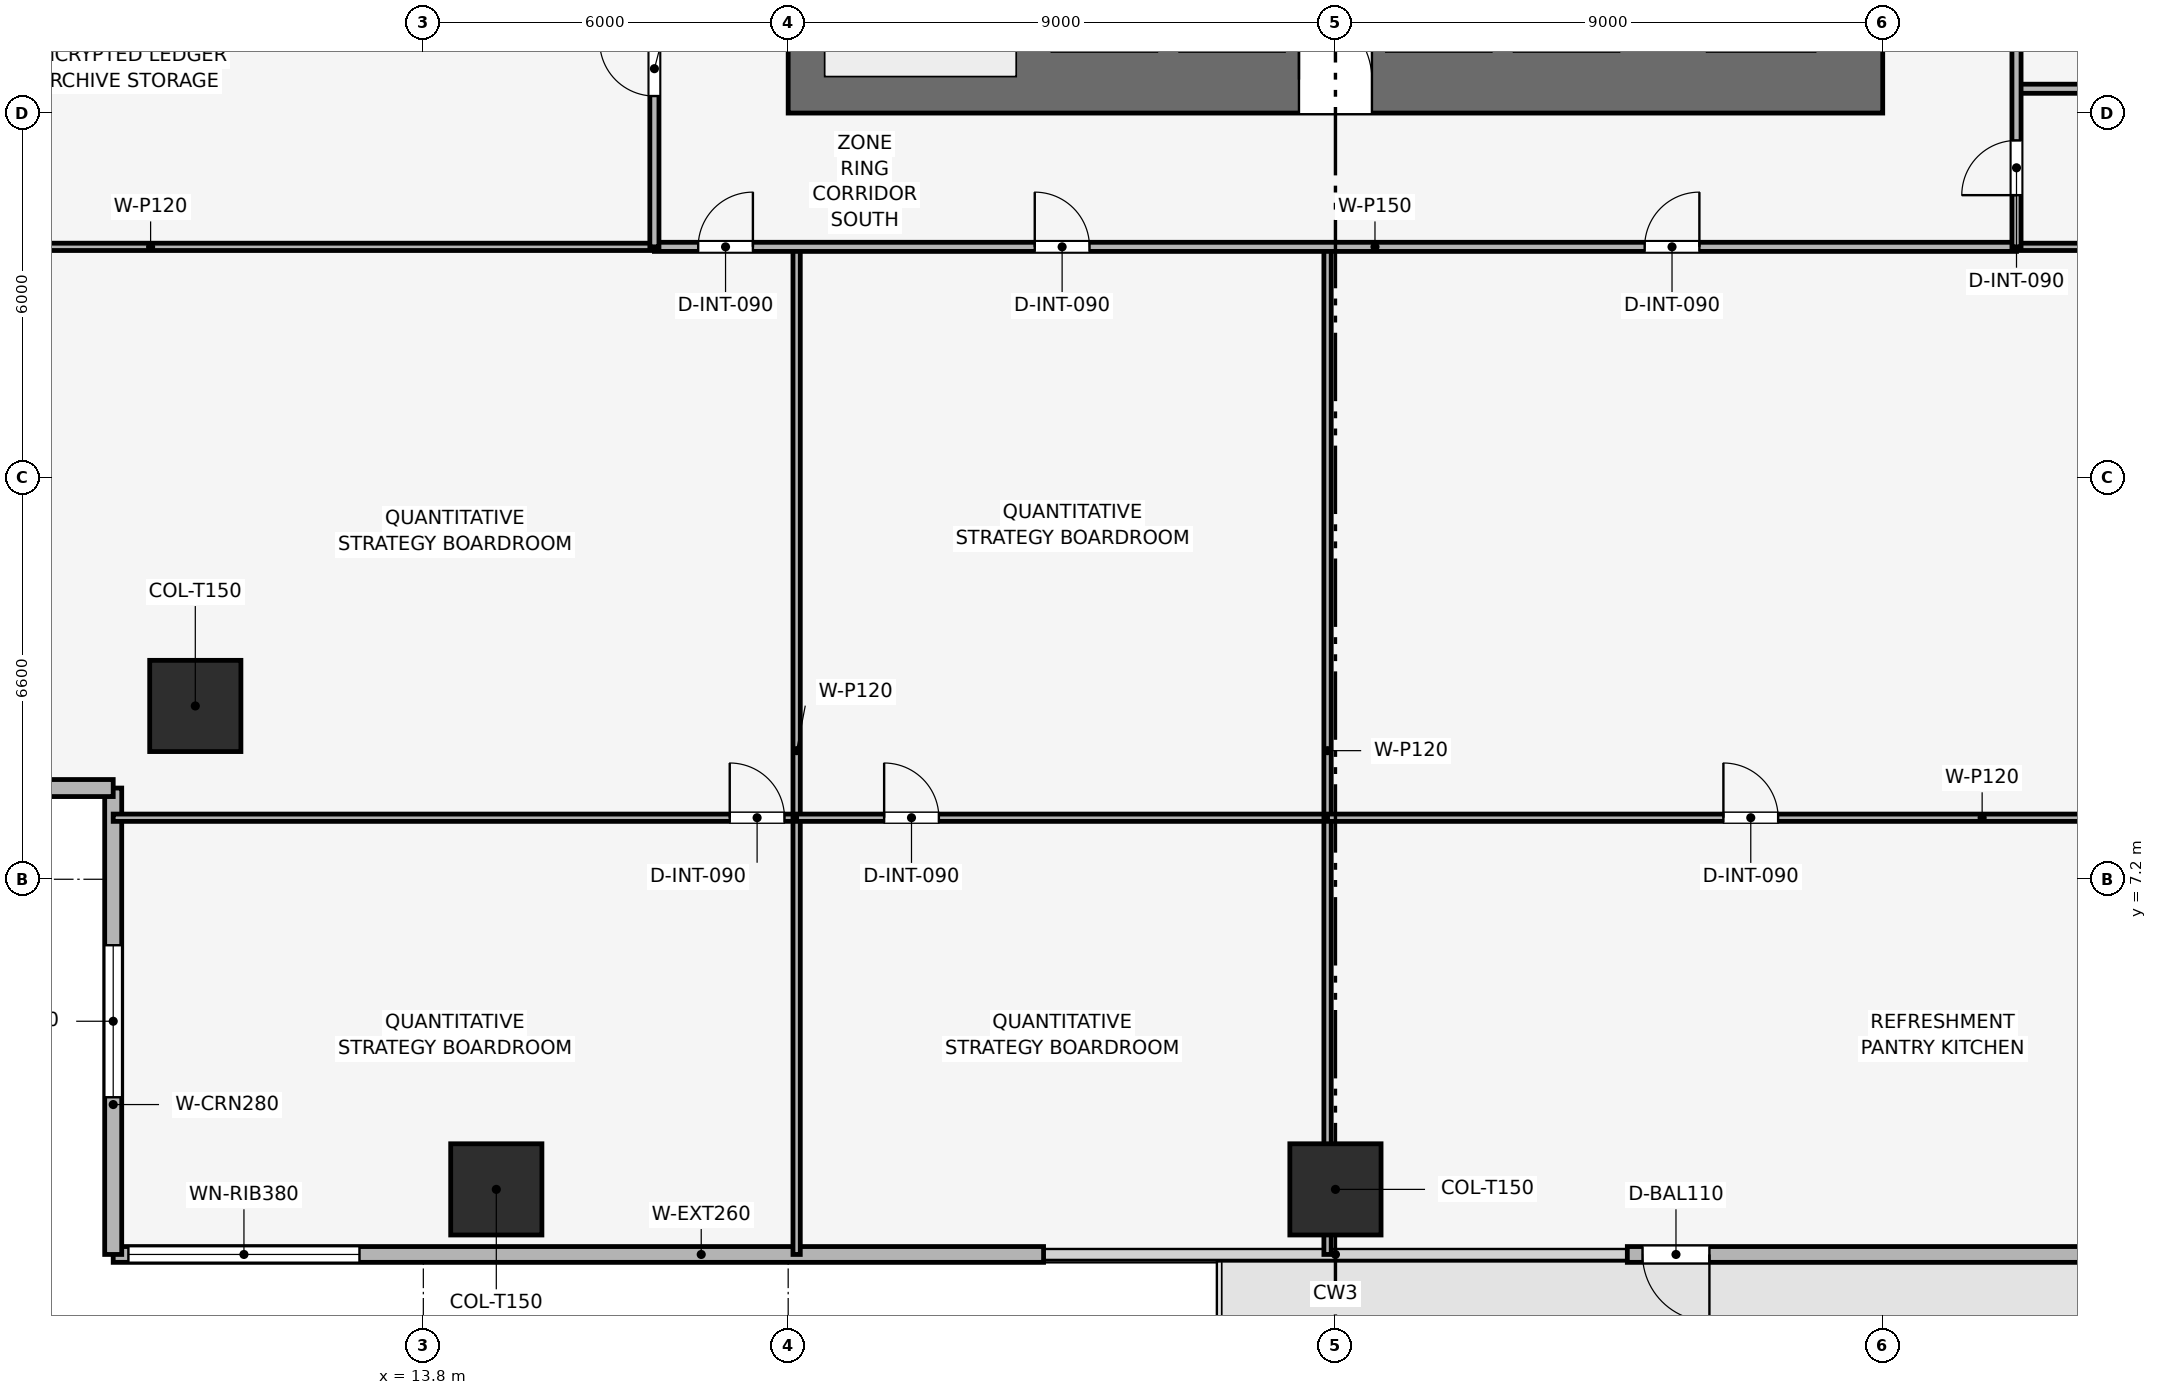
"""IFC4 building model, lengths in metres.
Left out: names, types, materials, properties, quantities, classifications, styles, units other than length and angle.
Written with IfcOpenShell. Run it as: python <this file> out.ifc"""

import sys

from ifc_helpers import new_model, si_unit, direction, frame, frame_2d, origin, origin_2d, place, context, subcontext, project, spatial, rectangle, extrude, element, fill, save


model = new_model("IFC4")
c1 = context("Model", 3, precision=1e-05, world=origin(), true_north=direction((0.0, 1.0)))
c2 = subcontext(c1, "Body", "Model", "MODEL_VIEW")
j1 = project(units=[si_unit("LENGTHUNIT", "METRE"), si_unit("PLANEANGLEUNIT", "RADIAN")], contexts=[c1])
p1 = place(None, origin())
s1 = spatial("IfcSite", under=j1, at=p1, CompositionType="ELEMENT")
p2 = place(p1, origin())
s2 = spatial("IfcBuilding", under=s1, at=p2, CompositionType="ELEMENT")
p3 = place(p2, frame((0.0, 0.0, 61.2)))
s3 = spatial("IfcBuildingStorey", under=s2, at=p3, CompositionType="ELEMENT", Elevation=61.2)
p4 = place(p3, frame((19.8, 20.35, 0.0), z_axis=(0.0, 0.0, 1.0), x_axis=(1.0, 0.0, 0.0)))
e1 = element("IfcWall", 1, at=p4, inside=s3, PredefinedType="SHEAR", context=c2, shape_type="SweptSolid", body=[
    extrude(rectangle(XDim=18.0, YDim=1.1, at=frame_2d((9.0, 0.0))), origin(), (0.0, 0.0, 1.0), 3.9),
])
p5 = place(p4, frame((8.4, 0.0, 0.0)))
e2 = element("IfcOpeningElement", 2, at=p5, cuts=e1, PredefinedType="OPENING", context=c2, shape_type="SweptSolid", body=[
    extrude(rectangle(XDim=1.2, YDim=2.2, at=frame_2d((0.6, 1.1))), frame((0.0, 0.56, 0.0), z_axis=(0.0, -1.0, 0.0), x_axis=(1.0, 0.0, 0.0)), (0.0, 0.0, 1.0), 1.12),
])
for number, where, z_axis, x_axis in (
    (3, (15.0, 2.1, 0.003), (0.0, 0.0, 1.0), (1.0, 0.0, 0.0)),
    (4, (28.8, 2.1, 0.003), (0.0, 0.0, 1.0), (1.0, 0.0, 0.0)),
    (5, (10.05, 10.05, 0.003), (0.0, 0.0, 1.0), (1.0, 0.0, 0.0)),
):
    element("IfcColumn", number, at=place(p3, frame(where, z_axis=z_axis, x_axis=x_axis)), inside=s3, PredefinedType="COLUMN", context=c2, shape_type="SweptSolid", body=[
        extrude(rectangle(XDim=1.5, YDim=1.5, at=origin_2d()), origin(), (0.0, 0.0, 1.0), 3.644),
    ])
p6 = place(p3, frame((48.9, 1.03, 0.0), z_axis=(0.0, 0.0, 1.0), x_axis=(-1.0, 0.0, 0.0)))
e6 = element("IfcWall", 6, at=p6, inside=s3, PredefinedType="SOLIDWALL", context=c2, shape_type="SweptSolid", body=[
    extrude(rectangle(XDim=15.3, YDim=0.26, at=frame_2d((7.65, 0.0))), origin(), (0.0, 0.0, 1.0), 3.65),
])
p7 = place(p6, frame((13.95, 0.0, 0.0)))
e7 = element("IfcOpeningElement", 7, at=p7, cuts=e6, PredefinedType="OPENING", context=c2, shape_type="SweptSolid", body=[
    extrude(rectangle(XDim=1.1, YDim=2.2, at=frame_2d((0.55, 1.1))), frame((0.0, 0.14, 0.0), z_axis=(0.0, -1.0, 0.0), x_axis=(1.0, 0.0, 0.0)), (0.0, 0.0, 1.0), 0.28),
])
p8 = place(p3, frame((24.0, 1.03, 0.0), z_axis=(0.0, 0.0, 1.0), x_axis=(-1.0, 0.0, 0.0)))
e8 = element("IfcWall", 8, at=p8, inside=s3, PredefinedType="SOLIDWALL", context=c2, shape_type="SweptSolid", body=[
    extrude(rectangle(XDim=15.3, YDim=0.26, at=frame_2d((7.65, 0.0))), origin(), (0.0, 0.0, 1.0), 3.65),
])
p9 = place(p8, frame((11.25, 0.0, 0.9)))
e9 = element("IfcOpeningElement", 9, at=p9, cuts=e8, PredefinedType="OPENING", context=c2, shape_type="SweptSolid", body=[
    extrude(rectangle(XDim=3.8, YDim=1.9, at=frame_2d((1.9, 0.95))), frame((0.0, 0.14, 0.0), z_axis=(0.0, -1.0, 0.0), x_axis=(1.0, 0.0, 0.0)), (0.0, 0.0, 1.0), 0.28),
])
p10 = place(p3, frame((8.7, 1.03, 0.0), z_axis=(0.0, 0.0, 1.0), x_axis=(0.0, 1.0, 0.0)))
e10 = element("IfcWall", 10, at=p10, inside=s3, PredefinedType="SOLIDWALL", context=c2, shape_type="SweptSolid", body=[
    extrude(rectangle(XDim=7.67, YDim=0.28, at=frame_2d((3.835, 0.0))), origin(), (0.0, 0.0, 1.0), 3.65),
])
p11 = place(p10, frame((2.585, 0.0, 0.9)))
e11 = element("IfcOpeningElement", 11, at=p11, cuts=e10, PredefinedType="OPENING", context=c2, shape_type="SweptSolid", body=[
    extrude(rectangle(XDim=2.5, YDim=1.9, at=frame_2d((1.25, 0.95))), frame((0.0, 0.15, 0.0), z_axis=(0.0, -1.0, 0.0), x_axis=(1.0, 0.0, 0.0)), (0.0, 0.0, 1.0), 0.3),
])
p12 = place(p3, frame((8.7, 8.7, 0.0), z_axis=(0.0, 0.0, 1.0), x_axis=(-1.0, 0.0, 0.0)))
e12 = element("IfcWall", 12, at=p12, inside=s3, PredefinedType="SOLIDWALL", context=c2, shape_type="SweptSolid", body=[
    extrude(rectangle(XDim=7.67, YDim=0.28, at=frame_2d((3.835, 0.0))), origin(), (0.0, 0.0, 1.0), 3.65),
])
p13 = place(p12, frame((2.585, 0.0, 0.9)))
e13 = element("IfcOpeningElement", 13, at=p13, cuts=e12, PredefinedType="OPENING", context=c2, shape_type="SweptSolid", body=[
    extrude(rectangle(XDim=2.5, YDim=1.9, at=frame_2d((1.25, 0.95))), frame((0.0, 0.15, 0.0), z_axis=(0.0, -1.0, 0.0), x_axis=(1.0, 0.0, 0.0)), (0.0, 0.0, 1.0), 0.3),
])
p14 = place(p3, frame((8.7, 8.212, 0.0), z_axis=(0.0, 0.0, 1.0), x_axis=(1.0, 0.0, 0.0)))
e14 = element("IfcWall", 14, at=p14, inside=s3, PredefinedType="PARTITIONING", context=c2, shape_type="SweptSolid", body=[
    extrude(rectangle(XDim=11.239, YDim=0.12, at=frame_2d((5.62, 0.0))), origin(), (0.0, 0.0, 1.0), 2.935),
])
p15 = place(p14, frame((10.139, 0.0, 0.0)))
e15 = element("IfcOpeningElement", 15, at=p15, cuts=e14, PredefinedType="OPENING", context=c2, shape_type="SweptSolid", body=[
    extrude(rectangle(XDim=0.9, YDim=2.1, at=frame_2d((0.45, 1.05))), frame((0.0, 0.07, 0.0), z_axis=(0.0, -1.0, 0.0), x_axis=(1.0, 0.0, 0.0)), (0.0, 0.0, 1.0), 0.14),
])
p16 = place(p3, frame((19.939, 1.03, 0.0), z_axis=(0.0, 0.0, 1.0), x_axis=(0.0, 1.0, 0.0)))
e16 = element("IfcWall", 16, at=p16, inside=s3, PredefinedType="PARTITIONING", context=c2, shape_type="SweptSolid", body=[
    extrude(rectangle(XDim=16.57, YDim=0.12, at=frame_2d((8.285, 0.0))), origin(), (0.0, 0.0, 1.0), 2.935),
])
p17 = place(p3, frame((19.939, 8.212, 0.0), z_axis=(0.0, 0.0, 1.0), x_axis=(1.0, 0.0, 0.0)))
e17 = element("IfcWall", 17, at=p17, inside=s3, PredefinedType="PARTITIONING", context=c2, shape_type="SweptSolid", body=[
    extrude(rectangle(XDim=8.731, YDim=0.12, at=frame_2d((4.365, 0.0))), origin(), (0.0, 0.0, 1.0), 3.085),
])
p18 = place(p17, frame((1.439, 0.0, 0.0)))
e18 = element("IfcOpeningElement", 18, at=p18, cuts=e17, PredefinedType="OPENING", context=c2, shape_type="SweptSolid", body=[
    extrude(rectangle(XDim=0.9, YDim=2.1, at=frame_2d((0.45, 1.05))), frame((0.0, 0.07, 0.0), z_axis=(0.0, -1.0, 0.0), x_axis=(1.0, 0.0, 0.0)), (0.0, 0.0, 1.0), 0.14),
])
p19 = place(p3, frame((28.67, 1.03, 0.0), z_axis=(0.0, 0.0, 1.0), x_axis=(0.0, 1.0, 0.0)))
e19 = element("IfcWall", 19, at=p19, inside=s3, PredefinedType="PARTITIONING", context=c2, shape_type="SweptSolid", body=[
    extrude(rectangle(XDim=16.57, YDim=0.12, at=frame_2d((8.285, 0.0))), origin(), (0.0, 0.0, 1.0), 3.085),
])
p20 = place(p3, frame((28.67, 8.212, 0.0), z_axis=(0.0, 0.0, 1.0), x_axis=(1.0, 0.0, 0.0)))
e20 = element("IfcWall", 20, at=p20, inside=s3, PredefinedType="PARTITIONING", context=c2, shape_type="SweptSolid", body=[
    extrude(rectangle(XDim=20.23, YDim=0.12, at=frame_2d((10.115, 0.0))), origin(), (0.0, 0.0, 1.0), 2.935),
])
p21 = place(p20, frame((6.51, 0.0, 0.0)))
e21 = element("IfcOpeningElement", 21, at=p21, cuts=e20, PredefinedType="OPENING", context=c2, shape_type="SweptSolid", body=[
    extrude(rectangle(XDim=0.9, YDim=2.1, at=frame_2d((0.45, 1.05))), frame((0.0, 0.07, 0.0), z_axis=(0.0, -1.0, 0.0), x_axis=(1.0, 0.0, 0.0)), (0.0, 0.0, 1.0), 0.14),
])
for number, where, z_axis, x_axis in (
    (22, (1.03, 17.6, 0.0), (0.0, 0.0, 1.0), (1.0, 0.0, 0.0)),
    (23, (40.0, 17.6, 0.0), (0.0, 0.0, 1.0), (1.0, 0.0, 0.0)),
):
    element("IfcWall", number, at=place(p3, frame(where, z_axis=z_axis, x_axis=x_axis)), inside=s3, PredefinedType="PARTITIONING", context=c2, shape_type="SweptSolid", body=[
        extrude(rectangle(XDim=16.57, YDim=0.12, at=frame_2d((8.285, 0.0))), origin(), (0.0, 0.0, 1.0), 2.935),
    ])
p22 = place(p3, frame((40.0, 20.2, 0.0), z_axis=(0.0, 0.0, 1.0), x_axis=(1.0, 0.0, 0.0)))
e24 = element("IfcWall", 24, at=p22, inside=s3, PredefinedType="PARTITIONING", context=c2, shape_type="SweptSolid", body=[
    extrude(rectangle(XDim=16.57, YDim=0.15, at=frame_2d((8.285, 0.0))), origin(), (0.0, 0.0, 1.0), 2.935),
])
p23 = place(p22, frame((9.435, 0.0, 0.0)))
e25 = element("IfcOpeningElement", 25, at=p23, cuts=e24, PredefinedType="OPENING", context=c2, shape_type="SweptSolid", body=[
    extrude(rectangle(XDim=0.9, YDim=2.1, at=frame_2d((0.45, 1.05))), frame((0.0, 0.085, 0.0), z_axis=(0.0, -1.0, 0.0), x_axis=(1.0, 0.0, 0.0)), (0.0, 0.0, 1.0), 0.17),
])
p24 = place(p3, frame((17.6, 17.6, 0.0), z_axis=(0.0, 0.0, 1.0), x_axis=(1.0, 0.0, 0.0)))
e26 = element("IfcWall", 26, at=p24, inside=s3, PredefinedType="PARTITIONING", context=c2, shape_type="SweptSolid", body=[
    extrude(rectangle(XDim=22.4, YDim=0.15, at=frame_2d((11.2, 0.0))), origin(), (0.0, 0.0, 1.0), 3.085),
])
p25 = place(p24, frame((0.72, 0.0, 0.0)))
e27 = element("IfcOpeningElement", 27, at=p25, cuts=e26, PredefinedType="OPENING", context=c2, shape_type="SweptSolid", body=[
    extrude(rectangle(XDim=0.9, YDim=2.1, at=frame_2d((0.45, 1.05))), frame((0.0, 0.085, 0.0), z_axis=(0.0, -1.0, 0.0), x_axis=(1.0, 0.0, 0.0)), (0.0, 0.0, 1.0), 0.17),
])
p26 = place(p24, frame((6.255, 0.0, 0.0)))
e28 = element("IfcOpeningElement", 28, at=p26, cuts=e26, PredefinedType="OPENING", context=c2, shape_type="SweptSolid", body=[
    extrude(rectangle(XDim=0.9, YDim=2.1, at=frame_2d((0.45, 1.05))), frame((0.0, 0.085, 0.0), z_axis=(0.0, -1.0, 0.0), x_axis=(1.0, 0.0, 0.0)), (0.0, 0.0, 1.0), 0.17),
])
p27 = place(p24, frame((16.285, 0.0, 0.0)))
e29 = element("IfcOpeningElement", 29, at=p27, cuts=e26, PredefinedType="OPENING", context=c2, shape_type="SweptSolid", body=[
    extrude(rectangle(XDim=0.9, YDim=2.1, at=frame_2d((0.45, 1.05))), frame((0.0, 0.085, 0.0), z_axis=(0.0, -1.0, 0.0), x_axis=(1.0, 0.0, 0.0)), (0.0, 0.0, 1.0), 0.17),
])
p28 = place(p3, frame((17.6, 17.6, 0.0), z_axis=(0.0, 0.0, 1.0), x_axis=(0.0, 1.0, 0.0)))
e30 = element("IfcWall", 30, at=p28, inside=s3, PredefinedType="PARTITIONING", context=c2, shape_type="SweptSolid", body=[
    extrude(rectangle(XDim=22.4, YDim=0.15, at=frame_2d((11.2, 0.0))), origin(), (0.0, 0.0, 1.0), 3.085),
])
p29 = place(p28, frame((2.48, 0.0, 0.0)))
e31 = element("IfcOpeningElement", 31, at=p29, cuts=e30, PredefinedType="OPENING", context=c2, shape_type="SweptSolid", body=[
    extrude(rectangle(XDim=0.9, YDim=2.1, at=frame_2d((0.45, 1.05))), frame((0.0, 0.085, 0.0), z_axis=(0.0, -1.0, 0.0), x_axis=(1.0, 0.0, 0.0)), (0.0, 0.0, 1.0), 0.17),
])
p30 = place(p28, frame((13.68, 0.0, 0.0)))
e32 = element("IfcOpeningElement", 32, at=p30, cuts=e30, PredefinedType="OPENING", context=c2, shape_type="SweptSolid", body=[
    extrude(rectangle(XDim=0.9, YDim=2.1, at=frame_2d((0.45, 1.05))), frame((0.0, 0.085, 0.0), z_axis=(0.0, -1.0, 0.0), x_axis=(1.0, 0.0, 0.0)), (0.0, 0.0, 1.0), 0.17),
])
p31 = place(p3, frame((40.0, 17.6, 0.0), z_axis=(0.0, 0.0, 1.0), x_axis=(0.0, 1.0, 0.0)))
e33 = element("IfcWall", 33, at=p31, inside=s3, PredefinedType="PARTITIONING", context=c2, shape_type="SweptSolid", body=[
    extrude(rectangle(XDim=22.4, YDim=0.15, at=frame_2d((11.2, 0.0))), origin(), (0.0, 0.0, 1.0), 3.085),
])
p32 = place(p31, frame((0.85, 0.0, 0.0)))
e34 = element("IfcOpeningElement", 34, at=p32, cuts=e33, PredefinedType="OPENING", context=c2, shape_type="SweptSolid", body=[
    extrude(rectangle(XDim=0.9, YDim=2.1, at=frame_2d((0.45, 1.05))), frame((0.0, 0.085, 0.0), z_axis=(0.0, -1.0, 0.0), x_axis=(1.0, 0.0, 0.0)), (0.0, 0.0, 1.0), 0.17),
])
p33 = place(p31, frame((3.55, 0.0, 0.0)))
e35 = element("IfcOpeningElement", 35, at=p33, cuts=e33, PredefinedType="OPENING", context=c2, shape_type="SweptSolid", body=[
    extrude(rectangle(XDim=0.9, YDim=2.1, at=frame_2d((0.45, 1.05))), frame((0.0, 0.085, 0.0), z_axis=(0.0, -1.0, 0.0), x_axis=(1.0, 0.0, 0.0)), (0.0, 0.0, 1.0), 0.17),
])
p34 = place(p31, frame((6.45, 0.0, 0.0)))
e36 = element("IfcOpeningElement", 36, at=p34, cuts=e33, PredefinedType="OPENING", context=c2, shape_type="SweptSolid", body=[
    extrude(rectangle(XDim=0.9, YDim=2.1, at=frame_2d((0.45, 1.05))), frame((0.0, 0.085, 0.0), z_axis=(0.0, -1.0, 0.0), x_axis=(1.0, 0.0, 0.0)), (0.0, 0.0, 1.0), 0.17),
])
p35 = place(p31, frame((9.2, 0.0, 0.0)))
e37 = element("IfcOpeningElement", 37, at=p35, cuts=e33, PredefinedType="OPENING", context=c2, shape_type="SweptSolid", body=[
    extrude(rectangle(XDim=0.95, YDim=2.1, at=frame_2d((0.475, 1.05))), frame((0.0, 0.085, 0.0), z_axis=(0.0, -1.0, 0.0), x_axis=(1.0, 0.0, 0.0)), (0.0, 0.0, 1.0), 0.17),
])
p36 = place(p31, frame((16.25, 0.0, 0.0)))
e38 = element("IfcOpeningElement", 38, at=p36, cuts=e33, PredefinedType="OPENING", context=c2, shape_type="SweptSolid", body=[
    extrude(rectangle(XDim=0.9, YDim=2.1, at=frame_2d((0.45, 1.05))), frame((0.0, 0.085, 0.0), z_axis=(0.0, -1.0, 0.0), x_axis=(1.0, 0.0, 0.0)), (0.0, 0.0, 1.0), 0.17),
])
p37 = place(p7, origin())
e39 = element("IfcDoor", 39, at=p37, inside=s3, OperationType="SINGLE_SWING_LEFT", PredefinedType="DOOR", context=c2, shape_type="SweptSolid", body=[
    extrude(rectangle(XDim=1.1, YDim=2.2, at=frame_2d((0.55, 1.1))), frame((0.0, 0.025, 0.0), z_axis=(0.0, -1.0, 0.0), x_axis=(1.0, 0.0, 0.0)), (0.0, 0.0, 1.0), 0.05),
])
fill(e7, e39)
p38 = place(p9, origin())
e40 = element("IfcWindow", 40, at=p38, inside=s3, PartitioningType="SINGLE_PANEL", PredefinedType="WINDOW", context=c2, shape_type="SweptSolid", body=[
    extrude(rectangle(XDim=3.8, YDim=1.9, at=frame_2d((1.9, 0.95))), frame((0.0, 0.03, 0.0), z_axis=(0.0, -1.0, 0.0), x_axis=(1.0, 0.0, 0.0)), (0.0, 0.0, 1.0), 0.06),
])
fill(e9, e40)
p39 = place(p11, origin())
e41 = element("IfcWindow", 41, at=p39, inside=s3, PartitioningType="SINGLE_PANEL", PredefinedType="WINDOW", context=c2, shape_type="SweptSolid", body=[
    extrude(rectangle(XDim=2.5, YDim=1.9, at=frame_2d((1.25, 0.95))), frame((0.0, 0.03, 0.0), z_axis=(0.0, -1.0, 0.0), x_axis=(1.0, 0.0, 0.0)), (0.0, 0.0, 1.0), 0.06),
])
fill(e11, e41)
p40 = place(p15, origin())
e42 = element("IfcDoor", 42, at=p40, inside=s3, OperationType="SINGLE_SWING_LEFT", PredefinedType="DOOR", context=c2, shape_type="SweptSolid", body=[
    extrude(rectangle(XDim=0.9, YDim=2.1, at=frame_2d((0.45, 1.05))), frame((0.0, 0.025, 0.0), z_axis=(0.0, -1.0, 0.0), x_axis=(1.0, 0.0, 0.0)), (0.0, 0.0, 1.0), 0.05),
])
fill(e15, e42)
p41 = place(p18, origin())
e43 = element("IfcDoor", 43, at=p41, inside=s3, OperationType="SINGLE_SWING_LEFT", PredefinedType="DOOR", context=c2, shape_type="SweptSolid", body=[
    extrude(rectangle(XDim=0.9, YDim=2.1, at=frame_2d((0.45, 1.05))), frame((0.0, 0.025, 0.0), z_axis=(0.0, -1.0, 0.0), x_axis=(1.0, 0.0, 0.0)), (0.0, 0.0, 1.0), 0.05),
])
fill(e18, e43)
p42 = place(p21, origin())
e44 = element("IfcDoor", 44, at=p42, inside=s3, OperationType="SINGLE_SWING_LEFT", PredefinedType="DOOR", context=c2, shape_type="SweptSolid", body=[
    extrude(rectangle(XDim=0.9, YDim=2.1, at=frame_2d((0.45, 1.05))), frame((0.0, 0.025, 0.0), z_axis=(0.0, -1.0, 0.0), x_axis=(1.0, 0.0, 0.0)), (0.0, 0.0, 1.0), 0.05),
])
fill(e21, e44)
p43 = place(p25, origin())
e45 = element("IfcDoor", 45, at=p43, inside=s3, OperationType="SINGLE_SWING_RIGHT", PredefinedType="DOOR", context=c2, shape_type="SweptSolid", body=[
    extrude(rectangle(XDim=0.9, YDim=2.1, at=frame_2d((0.45, 1.05))), frame((0.0, 0.025, 0.0), z_axis=(0.0, -1.0, 0.0), x_axis=(1.0, 0.0, 0.0)), (0.0, 0.0, 1.0), 0.05),
])
fill(e27, e45)
p44 = place(p26, origin())
e46 = element("IfcDoor", 46, at=p44, inside=s3, OperationType="SINGLE_SWING_LEFT", PredefinedType="DOOR", context=c2, shape_type="SweptSolid", body=[
    extrude(rectangle(XDim=0.9, YDim=2.1, at=frame_2d((0.45, 1.05))), frame((0.0, 0.025, 0.0), z_axis=(0.0, -1.0, 0.0), x_axis=(1.0, 0.0, 0.0)), (0.0, 0.0, 1.0), 0.05),
])
fill(e28, e46)
p45 = place(p27, origin())
e47 = element("IfcDoor", 47, at=p45, inside=s3, OperationType="SINGLE_SWING_RIGHT", PredefinedType="DOOR", context=c2, shape_type="SweptSolid", body=[
    extrude(rectangle(XDim=0.9, YDim=2.1, at=frame_2d((0.45, 1.05))), frame((0.0, 0.025, 0.0), z_axis=(0.0, -1.0, 0.0), x_axis=(1.0, 0.0, 0.0)), (0.0, 0.0, 1.0), 0.05),
])
fill(e29, e47)
p46 = place(p29, origin())
e48 = element("IfcDoor", 48, at=p46, inside=s3, OperationType="SINGLE_SWING_RIGHT", PredefinedType="DOOR", context=c2, shape_type="SweptSolid", body=[
    extrude(rectangle(XDim=0.9, YDim=2.1, at=frame_2d((0.45, 1.05))), frame((0.0, 0.025, 0.0), z_axis=(0.0, -1.0, 0.0), x_axis=(1.0, 0.0, 0.0)), (0.0, 0.0, 1.0), 0.05),
])
fill(e31, e48)
p47 = place(p32, origin())
e49 = element("IfcDoor", 49, at=p47, inside=s3, OperationType="SINGLE_SWING_LEFT", PredefinedType="DOOR", context=c2, shape_type="SweptSolid", body=[
    extrude(rectangle(XDim=0.9, YDim=2.1, at=frame_2d((0.45, 1.05))), frame((0.0, 0.025, 0.0), z_axis=(0.0, -1.0, 0.0), x_axis=(1.0, 0.0, 0.0)), (0.0, 0.0, 1.0), 0.05),
])
fill(e34, e49)
p48 = place(p5, origin())
e50 = element("IfcDoor", 50, at=p48, inside=s3, OperationType="SINGLE_SWING_LEFT", PredefinedType="DOOR", context=c2, shape_type="SweptSolid", body=[
    extrude(rectangle(XDim=1.2, YDim=2.2, at=frame_2d((0.6, 1.1))), frame((0.0, 0.025, 0.0), z_axis=(0.0, -1.0, 0.0), x_axis=(1.0, 0.0, 0.0)), (0.0, 0.0, 1.0), 0.05),
])
fill(e2, e50)
save(model, sys.argv[1])
